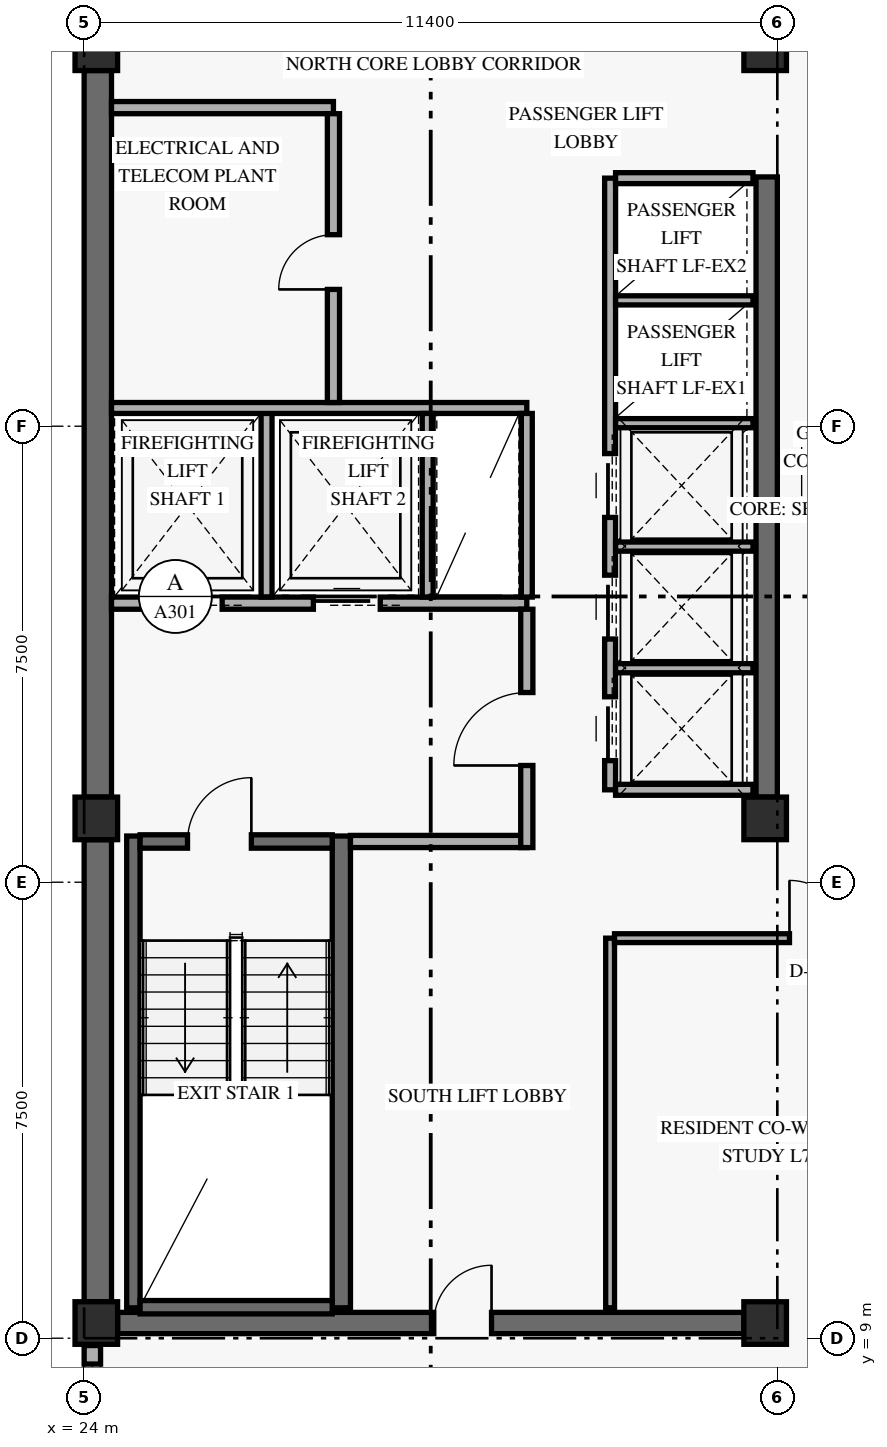
"""IFC4 building model, lengths in metres.
Left out: names, types, materials, properties, quantities, classifications, styles, units other than length and angle.
Written with IfcOpenShell. Run it as: python <this file> out.ifc"""

import sys

from ifc_helpers import new_model, si_unit, direction, frame, frame_2d, origin, origin_2d, place, context, subcontext, project, spatial, rectangle, extrude, element, fill, save


model = new_model("IFC4")
c1 = context("Model", 3, precision=1e-05, world=origin(), true_north=direction((0.0, 1.0)))
c2 = subcontext(c1, "Body", "Model", "MODEL_VIEW")
j1 = project(units=[si_unit("LENGTHUNIT", "METRE"), si_unit("PLANEANGLEUNIT", "RADIAN")], contexts=[c1])
p1 = place(None, origin())
s1 = spatial("IfcSite", under=j1, at=p1, CompositionType="ELEMENT")
p2 = place(p1, origin())
s2 = spatial("IfcBuilding", under=s1, at=p2, CompositionType="ELEMENT")
p3 = place(p2, frame((0.0, 0.0, 271.2)))
s3 = spatial("IfcBuildingStorey", under=s2, at=p3, CompositionType="ELEMENT", Elevation=271.2)
p4 = place(p3, frame((24.225, 9.6, 0.0), z_axis=(0.0, 0.0, 1.0), x_axis=(0.0, 1.0, 0.0)))
e1 = element("IfcWall", 1, at=p4, inside=s3, PredefinedType="SHEAR", context=c2, shape_type="SweptSolid", body=[
    extrude(rectangle(XDim=7.6, YDim=0.45, at=frame_2d((3.8, 0.0))), origin(), (0.0, 0.0, 1.0), 2.821),
])
p5 = place(p3, frame((24.225, 17.9, 0.0), z_axis=(0.0, 0.0, 1.0), x_axis=(0.0, 1.0, 0.0)))
e2 = element("IfcWall", 2, at=p5, inside=s3, PredefinedType="SHEAR", context=c2, shape_type="SweptSolid", body=[
    extrude(rectangle(XDim=11.95, YDim=0.45, at=frame_2d((5.975, 0.0))), origin(), (0.0, 0.0, 1.0), 2.821),
])
p6 = place(p3, frame((35.225, 17.9, 0.0), z_axis=(0.0, 0.0, 1.0), x_axis=(0.0, 1.0, 0.0)))
e3 = element("IfcWall", 3, at=p6, inside=s3, PredefinedType="SHEAR", context=c2, shape_type="SweptSolid", body=[
    extrude(rectangle(XDim=10.2, YDim=0.35, at=frame_2d((5.1, 0.0))), origin(), (0.0, 0.0, 1.0), 2.821),
])
p7 = place(p3, frame((24.55, 9.25, 0.0), z_axis=(0.0, 0.0, 1.0), x_axis=(1.0, 0.0, 0.0)))
e4 = element("IfcWall", 4, at=p7, inside=s3, PredefinedType="SHEAR", context=c2, shape_type="SweptSolid", body=[
    extrude(rectangle(XDim=10.3, YDim=0.35, at=frame_2d((5.15, 0.0))), origin(), (0.0, 0.0, 1.0), 3.36),
])
p8 = place(p7, frame((5.2, 0.0, 0.0)))
e5 = element("IfcOpeningElement", 5, at=p8, cuts=e4, PredefinedType="OPENING", context=c2, shape_type="SweptSolid", body=[
    extrude(rectangle(XDim=0.95, YDim=2.15, at=frame_2d((0.475, 1.075))), frame((0.0, 0.185, 0.0), z_axis=(0.0, -1.0, 0.0), x_axis=(1.0, 0.0, 0.0)), (0.0, 0.0, 1.0), 0.37),
])
p9 = place(p3, frame((24.81, 9.5, 0.0), z_axis=(0.0, 0.0, 1.0), x_axis=(0.0, 1.0, 0.0)))
e6 = element("IfcWall", 6, at=p9, inside=s3, PredefinedType="SHEAR", context=c2, shape_type="SweptSolid", body=[
    extrude(rectangle(XDim=7.76, YDim=0.22, at=frame_2d((3.88, 0.0))), origin(), (0.0, 0.0, 1.0), 3.36),
])
p10 = place(p3, frame((28.23, 9.5, 0.0), z_axis=(0.0, 0.0, 1.0), x_axis=(0.0, 1.0, 0.0)))
e7 = element("IfcWall", 7, at=p10, inside=s3, PredefinedType="SHEAR", context=c2, shape_type="SweptSolid", body=[
    extrude(rectangle(XDim=7.76, YDim=0.3, at=frame_2d((3.88, 0.0))), origin(), (0.0, 0.0, 1.0), 3.36),
])
p11 = place(p3, frame((24.92, 9.51, 0.0), z_axis=(0.0, 0.0, 1.0), x_axis=(1.0, 0.0, 0.0)))
e8 = element("IfcWall", 8, at=p11, inside=s3, PredefinedType="SHEAR", context=c2, shape_type="SweptSolid", body=[
    extrude(rectangle(XDim=3.16, YDim=0.22, at=frame_2d((1.58, 0.0))), origin(), (0.0, 0.0, 1.0), 3.36),
])
p12 = place(p3, frame((24.92, 17.17, 0.0), z_axis=(0.0, 0.0, 1.0), x_axis=(1.0, 0.0, 0.0)))
e9 = element("IfcWall", 9, at=p12, inside=s3, PredefinedType="SHEAR", context=c2, shape_type="SweptSolid", body=[
    extrude(rectangle(XDim=3.16, YDim=0.22, at=frame_2d((1.58, 0.0))), origin(), (0.0, 0.0, 1.0), 3.36),
])
p13 = place(p12, frame((0.78, 0.0, 0.0)))
e10 = element("IfcOpeningElement", 10, at=p13, cuts=e9, PredefinedType="OPENING", context=c2, shape_type="SweptSolid", body=[
    extrude(rectangle(XDim=1.05, YDim=2.15, at=frame_2d((0.525, 1.075))), frame((0.0, 0.12, 0.0), z_axis=(0.0, -1.0, 0.0), x_axis=(1.0, 0.0, 0.0)), (0.0, 0.0, 1.0), 0.24),
])
for number, where, z_axis, x_axis in (
    (11, (24.2, 9.25, 0.0), (0.0, 0.0, 1.0), (1.0, 0.0, 0.0)),
    (12, (24.2, 17.55, 0.0), (0.0, 0.0, 1.0), (1.0, 0.0, 0.0)),
    (13, (24.2, 30.2, 0.0), (0.0, 0.0, 1.0), (1.0, 0.0, 0.0)),
    (14, (35.2, 9.25, 0.0), (0.0, 0.0, 1.0), (1.0, 0.0, 0.0)),
    (15, (35.2, 17.55, 0.0), (0.0, 0.0, 1.0), (1.0, 0.0, 0.0)),
    (16, (35.2, 30.2, 0.0), (0.0, 0.0, 1.0), (1.0, 0.0, 0.0)),
):
    element("IfcColumn", number, at=place(p3, frame(where, z_axis=z_axis, x_axis=x_axis)), inside=s3, PredefinedType="COLUMN", context=c2, shape_type="SweptSolid", body=[
        extrude(rectangle(XDim=0.7, YDim=0.7, at=origin_2d()), origin(), (0.0, 0.0, 1.0), 3.6),
    ])
p14 = place(p3, frame((24.135, 7.32, 0.0), z_axis=(0.0, 0.0, 1.0), x_axis=(0.0, 1.0, 0.0)))
e17 = element("IfcWall", 17, at=p14, inside=s3, PredefinedType="SOLIDWALL", context=c2, shape_type="SweptSolid", body=[
    extrude(rectangle(XDim=1.56, YDim=0.27, at=frame_2d((0.78, 0.0))), origin(), (0.0, 0.0, 1.0), 2.803),
])
p15 = place(p14, frame((0.305, 0.0, 0.85)))
e18 = element("IfcOpeningElement", 18, at=p15, cuts=e17, PredefinedType="OPENING", context=c2, shape_type="SweptSolid", body=[
    extrude(rectangle(XDim=0.95, YDim=1.5, at=frame_2d((0.475, 0.75))), frame((0.0, 0.145, 0.0), z_axis=(0.0, -1.0, 0.0), x_axis=(1.0, 0.0, 0.0)), (0.0, 0.0, 1.0), 0.29),
])
p16 = place(p3, frame((24.45, 21.09, 0.0), z_axis=(0.0, 0.0, 1.0), x_axis=(1.0, 0.0, 0.0)))
e19 = element("IfcWall", 19, at=p16, inside=s3, PredefinedType="STANDARD", context=c2, shape_type="SweptSolid", body=[
    extrude(rectangle(XDim=6.83, YDim=0.2, at=frame_2d((3.415, 0.0))), origin(), (0.0, 0.0, 1.0), 3.36),
])
p17 = place(p16, frame((0.72, 0.0, 0.0)))
e20 = element("IfcOpeningElement", 20, at=p17, cuts=e19, PredefinedType="OPENING", context=c2, shape_type="SweptSolid", body=[
    extrude(rectangle(XDim=1.1, YDim=2.2, at=frame_2d((0.55, 1.1))), frame((0.0, 0.11, 0.0), z_axis=(0.0, -1.0, 0.0), x_axis=(1.0, 0.0, 0.0)), (0.0, 0.0, 1.0), 0.22),
])
p18 = place(p16, frame((3.32, 0.0, 0.0)))
e21 = element("IfcOpeningElement", 21, at=p18, cuts=e19, PredefinedType="OPENING", context=c2, shape_type="SweptSolid", body=[
    extrude(rectangle(XDim=1.1, YDim=2.2, at=frame_2d((0.55, 1.1))), frame((0.0, 0.11, 0.0), z_axis=(0.0, -1.0, 0.0), x_axis=(1.0, 0.0, 0.0)), (0.0, 0.0, 1.0), 0.22),
])
p19 = place(p3, frame((28.38, 17.17, 0.0), z_axis=(0.0, 0.0, 1.0), x_axis=(1.0, 0.0, 0.0)))
e22 = element("IfcWall", 22, at=p19, inside=s3, PredefinedType="STANDARD", context=c2, shape_type="SweptSolid", body=[
    extrude(rectangle(XDim=2.9, YDim=0.2, at=frame_2d((1.45, 0.0))), origin(), (0.0, 0.0, 1.0), 3.36),
])
p20 = place(p3, frame((31.28, 17.07, 0.0), z_axis=(0.0, 0.0, 1.0), x_axis=(0.0, 1.0, 0.0)))
e23 = element("IfcWall", 23, at=p20, inside=s3, PredefinedType="STANDARD", context=c2, shape_type="SweptSolid", body=[
    extrude(rectangle(XDim=3.92, YDim=0.2, at=frame_2d((1.96, 0.0))), origin(), (0.0, 0.0, 1.0), 2.803),
])
p21 = place(p20, frame((1.35, 0.0, 0.0)))
e24 = element("IfcOpeningElement", 24, at=p21, cuts=e23, PredefinedType="OPENING", context=c2, shape_type="SweptSolid", body=[
    extrude(rectangle(XDim=1.2, YDim=2.15, at=frame_2d((0.6, 1.075))), frame((0.0, 0.11, 0.0), z_axis=(0.0, -1.0, 0.0), x_axis=(1.0, 0.0, 0.0)), (0.0, 0.0, 1.0), 0.22),
])
p22 = place(p3, frame((27.0, 21.19, 0.0), z_axis=(0.0, 0.0, 1.0), x_axis=(0.0, 1.0, 0.0)))
e25 = element("IfcWall", 25, at=p22, inside=s3, PredefinedType="STANDARD", context=c2, shape_type="SweptSolid", body=[
    extrude(rectangle(XDim=3.11, YDim=0.18, at=frame_2d((1.555, 0.0))), origin(), (0.0, 0.0, 1.0), 3.36),
])
p23 = place(p3, frame((24.45, 24.3, 0.0), z_axis=(0.0, 0.0, 1.0), x_axis=(1.0, 0.0, 0.0)))
e26 = element("IfcWall", 26, at=p23, inside=s3, PredefinedType="STANDARD", context=c2, shape_type="SweptSolid", body=[
    extrude(rectangle(XDim=6.83, YDim=0.18, at=frame_2d((3.415, 0.0))), origin(), (0.0, 0.0, 1.0), 3.36),
])
for number, where, z_axis, x_axis in (
    (27, (29.65, 21.19, 0.0), (0.0, 0.0, 1.0), (0.0, 1.0, 0.0)),
    (28, (31.28, 21.19, 0.0), (0.0, 0.0, 1.0), (0.0, 1.0, 0.0)),
):
    element("IfcWall", number, at=place(p3, frame(where, z_axis=z_axis, x_axis=x_axis)), inside=s3, PredefinedType="STANDARD", context=c2, shape_type="SweptSolid", body=[
        extrude(rectangle(XDim=3.02, YDim=0.18, at=frame_2d((1.51, 0.0))), origin(), (0.0, 0.0, 1.0), 3.36),
    ])
p24 = place(p3, frame((24.45, 29.24, 0.0), z_axis=(0.0, 0.0, 1.0), x_axis=(1.0, 0.0, 0.0)))
e29 = element("IfcWall", 29, at=p24, inside=s3, PredefinedType="STANDARD", context=c2, shape_type="SweptSolid", body=[
    extrude(rectangle(XDim=3.65, YDim=0.2, at=frame_2d((1.825, 0.0))), origin(), (0.0, 0.0, 1.0), 3.36),
])
p25 = place(p3, frame((28.1, 24.39, 0.0), z_axis=(0.0, 0.0, 1.0), x_axis=(0.0, 1.0, 0.0)))
e30 = element("IfcWall", 30, at=p25, inside=s3, PredefinedType="STANDARD", context=c2, shape_type="SweptSolid", body=[
    extrude(rectangle(XDim=4.75, YDim=0.2, at=frame_2d((2.375, 0.0))), origin(), (0.0, 0.0, 1.0), 3.36),
])
p26 = place(p25, frame((1.86, 0.0, 0.0)))
e31 = element("IfcOpeningElement", 31, at=p26, cuts=e30, PredefinedType="OPENING", context=c2, shape_type="SweptSolid", body=[
    extrude(rectangle(XDim=0.9, YDim=2.1, at=frame_2d((0.45, 1.05))), frame((0.0, 0.11, 0.0), z_axis=(0.0, -1.0, 0.0), x_axis=(1.0, 0.0, 0.0)), (0.0, 0.0, 1.0), 0.22),
])
p27 = place(p3, frame((32.65, 18.02, 0.0), z_axis=(0.0, 0.0, 1.0), x_axis=(0.0, 1.0, 0.0)))
e32 = element("IfcWall", 32, at=p27, inside=s3, PredefinedType="STANDARD", context=c2, shape_type="SweptSolid", body=[
    extrude(rectangle(XDim=10.06, YDim=0.18, at=frame_2d((5.03, 0.0))), origin(), (0.0, 0.0, 1.0), 3.36),
])
p28 = place(p27, frame((0.48, 0.0, 0.0)))
e33 = element("IfcOpeningElement", 33, at=p28, cuts=e32, PredefinedType="OPENING", context=c2, shape_type="SweptSolid", body=[
    extrude(rectangle(XDim=1.05, YDim=2.2, at=frame_2d((0.525, 1.1))), frame((0.0, 0.1, 0.0), z_axis=(0.0, -1.0, 0.0), x_axis=(1.0, 0.0, 0.0)), (0.0, 0.0, 1.0), 0.2),
])
p29 = place(p27, frame((2.48, 0.0, 0.0)))
e34 = element("IfcOpeningElement", 34, at=p29, cuts=e32, PredefinedType="OPENING", context=c2, shape_type="SweptSolid", body=[
    extrude(rectangle(XDim=1.05, YDim=2.2, at=frame_2d((0.525, 1.1))), frame((0.0, 0.1, 0.0), z_axis=(0.0, -1.0, 0.0), x_axis=(1.0, 0.0, 0.0)), (0.0, 0.0, 1.0), 0.2),
])
p30 = place(p27, frame((4.48, 0.0, 0.0)))
e35 = element("IfcOpeningElement", 35, at=p30, cuts=e32, PredefinedType="OPENING", context=c2, shape_type="SweptSolid", body=[
    extrude(rectangle(XDim=1.05, YDim=2.2, at=frame_2d((0.525, 1.1))), frame((0.0, 0.1, 0.0), z_axis=(0.0, -1.0, 0.0), x_axis=(1.0, 0.0, 0.0)), (0.0, 0.0, 1.0), 0.2),
])
for number, where, z_axis, x_axis in (
    (36, (32.74, 18.02, 0.0), (0.0, 0.0, 1.0), (1.0, 0.0, 0.0)),
    (37, (32.74, 28.08, 0.0), (0.0, 0.0, 1.0), (1.0, 0.0, 0.0)),
):
    element("IfcWall", number, at=place(p3, frame(where, z_axis=z_axis, x_axis=x_axis)), inside=s3, PredefinedType="STANDARD", context=c2, shape_type="SweptSolid", body=[
        extrude(rectangle(XDim=2.26, YDim=0.18, at=frame_2d((1.13, 0.0))), origin(), (0.0, 0.0, 1.0), 3.36),
    ])
for number, where, z_axis, x_axis in (
    (38, (32.74, 20.02, 0.0), (0.0, 0.0, 1.0), (1.0, 0.0, 0.0)),
    (39, (32.74, 22.02, 0.0), (0.0, 0.0, 1.0), (1.0, 0.0, 0.0)),
    (40, (32.74, 24.05, 0.0), (0.0, 0.0, 1.0), (1.0, 0.0, 0.0)),
    (41, (32.74, 26.07, 0.0), (0.0, 0.0, 1.0), (1.0, 0.0, 0.0)),
):
    element("IfcWall", number, at=place(p3, frame(where, z_axis=z_axis, x_axis=x_axis)), inside=s3, PredefinedType="STANDARD", context=c2, shape_type="SweptSolid", body=[
        extrude(rectangle(XDim=2.26, YDim=0.15, at=frame_2d((1.13, 0.0))), origin(), (0.0, 0.0, 1.0), 3.36),
    ])
p31 = place(p3, frame((32.65, 9.5, 0.0), z_axis=(0.0, 0.0, 1.0), x_axis=(0.0, 1.0, 0.0)))
e42 = element("IfcWall", 42, at=p31, inside=s3, PredefinedType="PARTITIONING", context=c2, shape_type="SweptSolid", body=[
    extrude(rectangle(XDim=6.08, YDim=0.145, at=frame_2d((3.04, 0.0))), origin(), (0.0, 0.0, 1.0), 3.36),
])
p32 = place(p3, frame((32.722, 15.58, 0.0), z_axis=(0.0, 0.0, 1.0), x_axis=(1.0, 0.0, 0.0)))
e43 = element("IfcWall", 43, at=p32, inside=s3, PredefinedType="PARTITIONING", context=c2, shape_type="SweptSolid", body=[
    extrude(rectangle(XDim=5.228, YDim=0.145, at=frame_2d((2.614, 0.0))), origin(), (0.0, 0.0, 1.0), 2.803),
])
p33 = place(p32, frame((2.877, 0.0, 0.0)))
e44 = element("IfcOpeningElement", 44, at=p33, cuts=e43, PredefinedType="OPENING", context=c2, shape_type="SweptSolid", body=[
    extrude(rectangle(XDim=0.95, YDim=2.15, at=frame_2d((0.475, 1.075))), frame((0.0, 0.083, 0.0), z_axis=(0.0, -1.0, 0.0), x_axis=(1.0, 0.0, 0.0)), (0.0, 0.0, 1.0), 0.165),
])
p34 = place(p15, origin())
e45 = element("IfcWindow", 45, at=p34, inside=s3, PartitioningType="SINGLE_PANEL", PredefinedType="WINDOW", context=c2, shape_type="SweptSolid", body=[
    extrude(rectangle(XDim=0.95, YDim=1.5, at=frame_2d((0.475, 0.75))), frame((0.0, 0.03, 0.0), z_axis=(0.0, -1.0, 0.0), x_axis=(1.0, 0.0, 0.0)), (0.0, 0.0, 1.0), 0.06),
])
fill(e18, e45)
p35 = place(p13, frame((1.05, 0.0, 0.0), z_axis=(0.0, 0.0, 1.0), x_axis=(-1.0, 0.0, 0.0)))
e46 = element("IfcDoor", 46, at=p35, inside=s3, OperationType="SINGLE_SWING_LEFT", PredefinedType="DOOR", context=c2, shape_type="SweptSolid", body=[
    extrude(rectangle(XDim=1.05, YDim=2.15, at=frame_2d((0.525, 1.075))), frame((0.0, 0.025, 0.0), z_axis=(0.0, -1.0, 0.0), x_axis=(1.0, 0.0, 0.0)), (0.0, 0.0, 1.0), 0.05),
])
fill(e10, e46)
p36 = place(p17, origin())
e47 = element("IfcDoor", 47, at=p36, inside=s3, OperationType="SLIDING_TO_LEFT", PredefinedType="DOOR", context=c2, shape_type="SweptSolid", body=[
    extrude(rectangle(XDim=1.1, YDim=2.2, at=frame_2d((0.55, 1.1))), frame((0.0, 0.025, 0.0), z_axis=(0.0, -1.0, 0.0), x_axis=(1.0, 0.0, 0.0)), (0.0, 0.0, 1.0), 0.05),
])
fill(e20, e47)
p37 = place(p18, origin())
e48 = element("IfcDoor", 48, at=p37, inside=s3, OperationType="SLIDING_TO_LEFT", PredefinedType="DOOR", context=c2, shape_type="SweptSolid", body=[
    extrude(rectangle(XDim=1.1, YDim=2.2, at=frame_2d((0.55, 1.1))), frame((0.0, 0.025, 0.0), z_axis=(0.0, -1.0, 0.0), x_axis=(1.0, 0.0, 0.0)), (0.0, 0.0, 1.0), 0.05),
])
fill(e21, e48)
p38 = place(p21, origin())
e49 = element("IfcDoor", 49, at=p38, inside=s3, OperationType="SINGLE_SWING_LEFT", PredefinedType="DOOR", context=c2, shape_type="SweptSolid", body=[
    extrude(rectangle(XDim=1.2, YDim=2.15, at=frame_2d((0.6, 1.075))), frame((0.0, 0.025, 0.0), z_axis=(0.0, -1.0, 0.0), x_axis=(1.0, 0.0, 0.0)), (0.0, 0.0, 1.0), 0.05),
])
fill(e24, e49)
p39 = place(p26, origin())
e50 = element("IfcDoor", 50, at=p39, inside=s3, OperationType="SINGLE_SWING_LEFT", PredefinedType="DOOR", context=c2, shape_type="SweptSolid", body=[
    extrude(rectangle(XDim=0.9, YDim=2.1, at=frame_2d((0.45, 1.05))), frame((0.0, 0.025, 0.0), z_axis=(0.0, -1.0, 0.0), x_axis=(1.0, 0.0, 0.0)), (0.0, 0.0, 1.0), 0.05),
])
fill(e31, e50)
p40 = place(p28, origin())
e51 = element("IfcDoor", 51, at=p40, inside=s3, OperationType="SLIDING_TO_LEFT", PredefinedType="DOOR", context=c2, shape_type="SweptSolid", body=[
    extrude(rectangle(XDim=1.05, YDim=2.2, at=frame_2d((0.525, 1.1))), frame((0.0, 0.025, 0.0), z_axis=(0.0, -1.0, 0.0), x_axis=(1.0, 0.0, 0.0)), (0.0, 0.0, 1.0), 0.05),
])
fill(e33, e51)
p41 = place(p29, origin())
e52 = element("IfcDoor", 52, at=p41, inside=s3, OperationType="SLIDING_TO_LEFT", PredefinedType="DOOR", context=c2, shape_type="SweptSolid", body=[
    extrude(rectangle(XDim=1.05, YDim=2.2, at=frame_2d((0.525, 1.1))), frame((0.0, 0.025, 0.0), z_axis=(0.0, -1.0, 0.0), x_axis=(1.0, 0.0, 0.0)), (0.0, 0.0, 1.0), 0.05),
])
fill(e34, e52)
p42 = place(p30, origin())
e53 = element("IfcDoor", 53, at=p42, inside=s3, OperationType="SLIDING_TO_LEFT", PredefinedType="DOOR", context=c2, shape_type="SweptSolid", body=[
    extrude(rectangle(XDim=1.05, YDim=2.2, at=frame_2d((0.525, 1.1))), frame((0.0, 0.025, 0.0), z_axis=(0.0, -1.0, 0.0), x_axis=(1.0, 0.0, 0.0)), (0.0, 0.0, 1.0), 0.05),
])
fill(e35, e53)
p43 = place(p33, origin())
e54 = element("IfcDoor", 54, at=p43, inside=s3, OperationType="SINGLE_SWING_LEFT", PredefinedType="DOOR", context=c2, shape_type="SweptSolid", body=[
    extrude(rectangle(XDim=0.95, YDim=2.15, at=frame_2d((0.475, 1.075))), frame((0.0, 0.025, 0.0), z_axis=(0.0, -1.0, 0.0), x_axis=(1.0, 0.0, 0.0)), (0.0, 0.0, 1.0), 0.05),
])
fill(e44, e54)
p44 = place(p8, frame((0.95, 0.0, 0.0), z_axis=(0.0, 0.0, 1.0), x_axis=(-1.0, 0.0, 0.0)))
e55 = element("IfcDoor", 55, at=p44, inside=s3, OperationType="SINGLE_SWING_LEFT", PredefinedType="DOOR", context=c2, shape_type="SweptSolid", body=[
    extrude(rectangle(XDim=0.95, YDim=2.15, at=frame_2d((0.475, 1.075))), frame((0.0, 0.025, 0.0), z_axis=(0.0, -1.0, 0.0), x_axis=(1.0, 0.0, 0.0)), (0.0, 0.0, 1.0), 0.05),
])
fill(e5, e55)
save(model, sys.argv[1])
